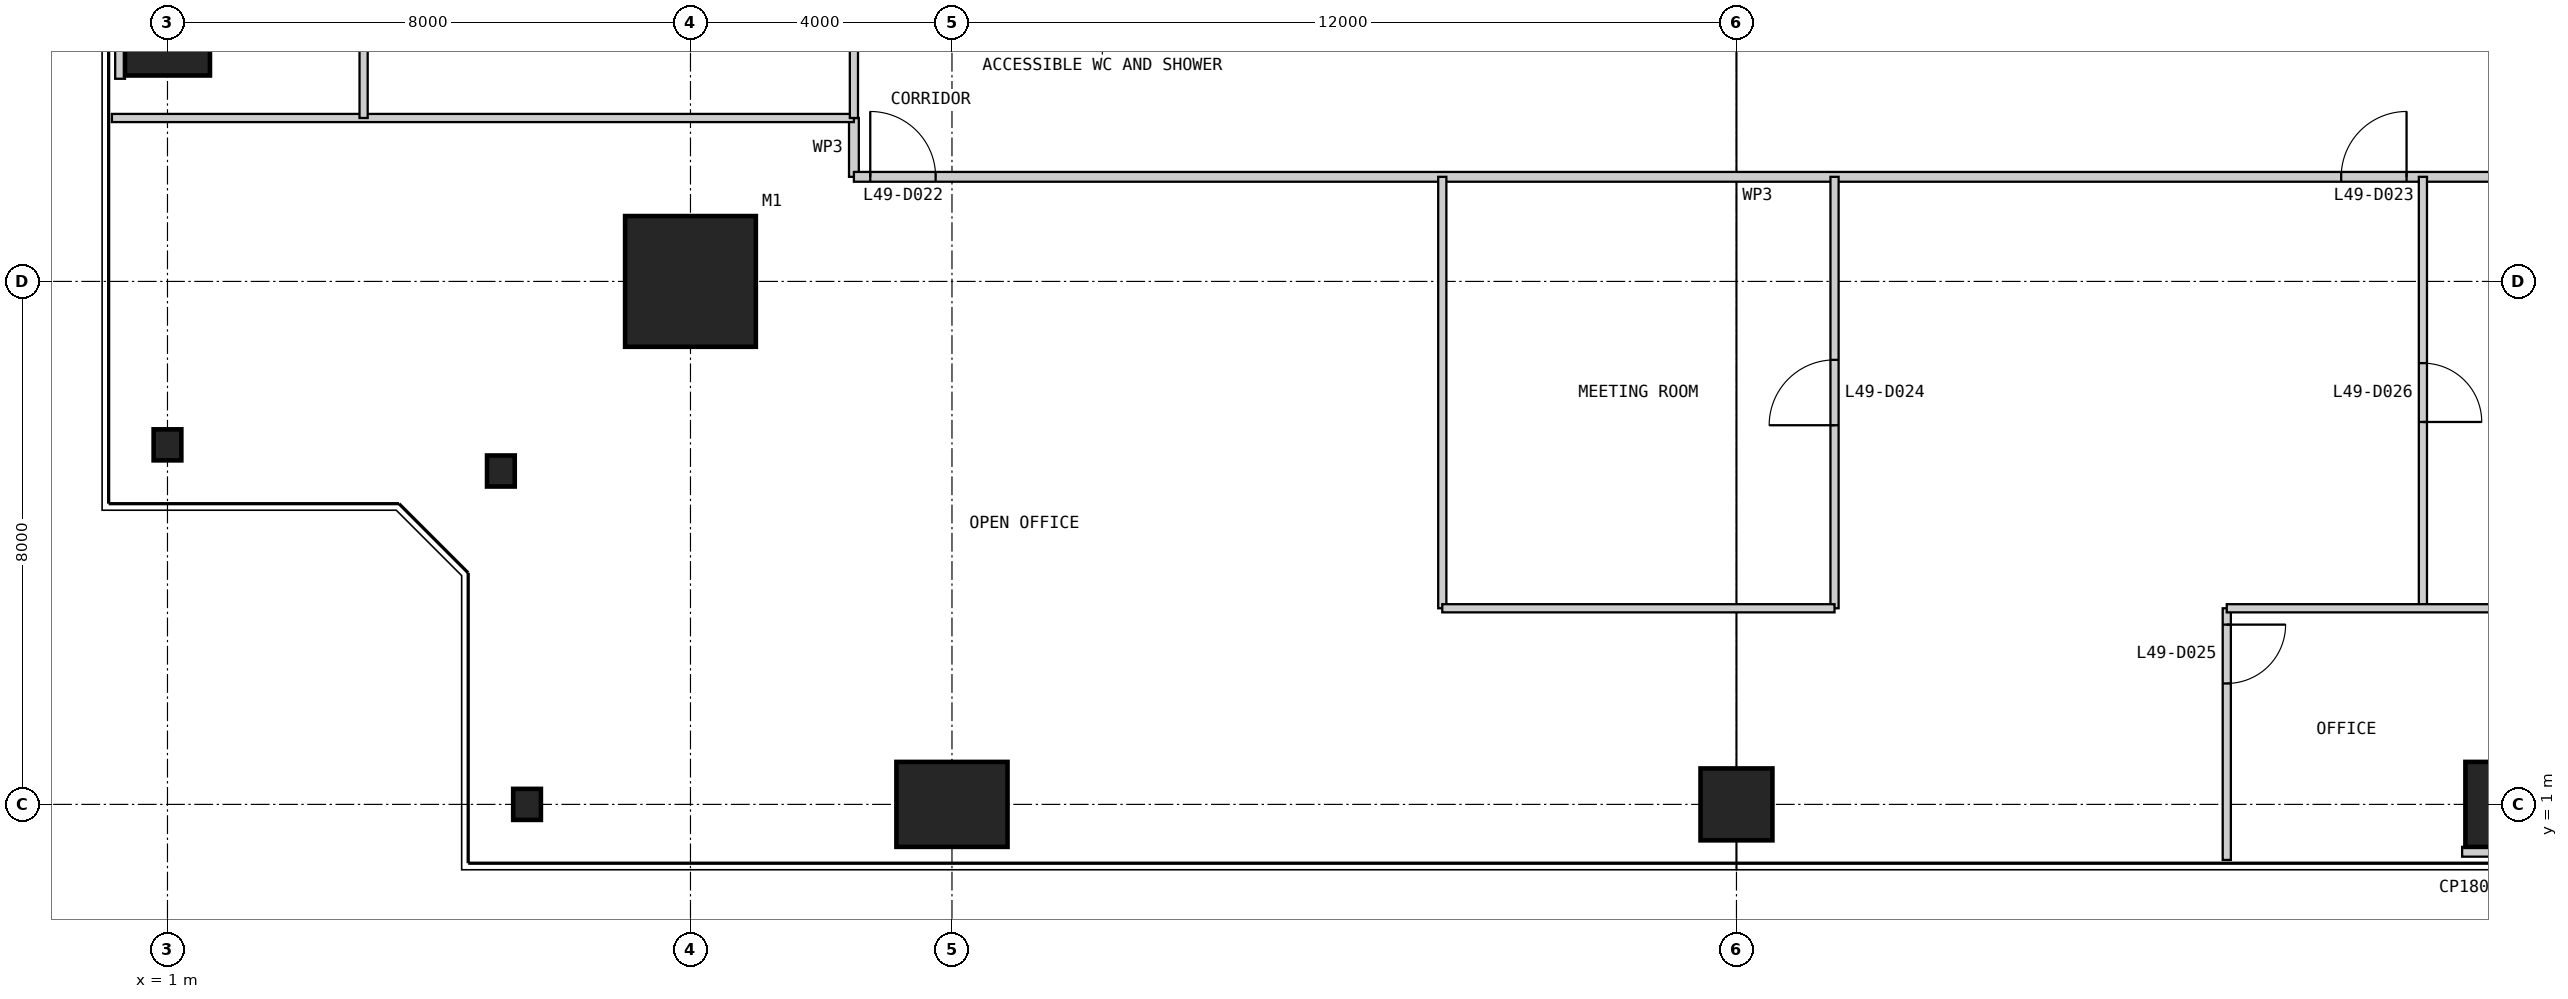
"""IFC4 building model, lengths in metres.
Left out: names, types, materials, properties, quantities, classifications, styles, units other than length and angle.
Written with IfcOpenShell. Run it as: python <this file> out.ifc"""

import sys

from ifc_helpers import new_model, si_unit, direction, frame, frame_2d, origin, origin_2d, place, context, subcontext, project, spatial, rectangle, i_section, extrude, element, fill, save


model = new_model("IFC4")
c1 = context("Model", 3, precision=1e-05, world=origin(), true_north=direction((0.0, 1.0)))
c2 = subcontext(c1, "Body", "Model", "MODEL_VIEW")
j1 = project(units=[si_unit("LENGTHUNIT", "METRE"), si_unit("PLANEANGLEUNIT", "RADIAN")], contexts=[c1])
p1 = place(None, origin())
s1 = spatial("IfcSite", under=j1, at=p1, CompositionType="ELEMENT")
p2 = place(p1, origin())
s2 = spatial("IfcBuilding", under=s1, at=p2, CompositionType="ELEMENT")
p3 = place(p2, frame((0.0, 0.0, 209.8)))
s3 = spatial("IfcBuildingStorey", under=s2, at=p3, CompositionType="ELEMENT", Elevation=209.8)
p4 = place(p3, frame((9.0, 9.0, 0.0), z_axis=(0.0, 0.0, 1.0), x_axis=(1.0, 0.0, 0.0)))
e1 = element("IfcColumn", 1, at=p4, inside=s3, PredefinedType="COLUMN", context=c2, shape_type="SweptSolid", body=[
    extrude(rectangle(XDim=2.0, YDim=2.0, at=origin_2d()), origin(), (0.0, 0.0, 1.0), 4.0),
])
p5 = place(p3, frame((6.5, 1.0, 0.0), z_axis=(0.0, 0.0, 1.0), x_axis=(1.0, 0.0, 0.0)))
e2 = element("IfcColumn", 2, at=p5, inside=s3, PredefinedType="COLUMN", context=c2, shape_type="SweptSolid", body=[
    extrude(i_section(OverallWidth=0.424, OverallDepth=0.475, WebThickness=0.048, FlangeThickness=0.077, at=origin_2d()), origin(), (0.0, 0.0, 1.0), 4.0),
])
p6 = place(p3, frame((13.0, 1.0, 0.0), z_axis=(0.0, 0.0, 1.0), x_axis=(1.0, 0.0, 0.0)))
e3 = element("IfcColumn", 3, at=p6, inside=s3, PredefinedType="COLUMN", context=c2, shape_type="SweptSolid", body=[
    extrude(rectangle(XDim=1.7, YDim=1.3, at=origin_2d()), origin(), (0.0, 0.0, 1.0), 4.0),
])
p7 = place(p3, frame((25.0, 1.0, 0.0), z_axis=(0.0, 0.0, 1.0), x_axis=(1.0, 0.0, 0.0)))
e4 = element("IfcColumn", 4, at=p7, inside=s3, PredefinedType="COLUMN", context=c2, shape_type="SweptSolid", body=[
    extrude(rectangle(XDim=1.1, YDim=1.1, at=origin_2d()), origin(), (0.0, 0.0, 1.0), 4.0),
])
p8 = place(p3, frame((37.0, 1.0, 0.0), z_axis=(0.0, 0.0, 1.0), x_axis=(1.0, 0.0, 0.0)))
e5 = element("IfcColumn", 5, at=p8, inside=s3, PredefinedType="COLUMN", context=c2, shape_type="SweptSolid", body=[
    extrude(rectangle(XDim=1.7, YDim=1.3, at=origin_2d()), origin(), (0.0, 0.0, 1.0), 4.0),
])
p9 = place(p3, frame((1.0, 13.0, 0.0), z_axis=(0.0, 0.0, 1.0), x_axis=(1.0, 0.0, 0.0)))
e6 = element("IfcColumn", 6, at=p9, inside=s3, PredefinedType="COLUMN", context=c2, shape_type="SweptSolid", body=[
    extrude(rectangle(XDim=1.3, YDim=1.7, at=origin_2d()), origin(), (0.0, 0.0, 1.0), 4.0),
])
for number, where, z_axis, x_axis in (
    (7, (1.0, 6.5, 0.0), (0.0, 0.0, 1.0), (1.0, 0.0, 0.0)),
    (8, (6.1, 6.1, 0.0), (0.0, 0.0, 1.0), (1.0, 0.0, 0.0)),
):
    element("IfcColumn", number, at=place(p3, frame(where, z_axis=z_axis, x_axis=x_axis)), inside=s3, PredefinedType="COLUMN", context=c2, shape_type="SweptSolid", body=[
        extrude(i_section(OverallWidth=0.424, OverallDepth=0.475, WebThickness=0.048, FlangeThickness=0.077, at=origin_2d()), origin(), (0.0, 0.0, 1.0), 4.0),
    ])
p10 = place(p3, frame((11.5, 11.5, 0.0), z_axis=(0.0, 0.0, 1.0), x_axis=(0.0, -1.0, 0.0)))
e9 = element("IfcWall", 9, at=p10, inside=s3, PredefinedType="PARTITIONING", context=c2, shape_type="SweptSolid", body=[
    extrude(rectangle(XDim=0.9, YDim=0.15, at=frame_2d((0.45, 0.0))), origin(), (0.0, 0.0, 1.0), 3.85),
])
p11 = place(p3, frame((11.5, 10.6, 0.0), z_axis=(0.0, 0.0, 1.0), x_axis=(1.0, 0.0, 0.0)))
e10 = element("IfcWall", 10, at=p11, inside=s3, PredefinedType="PARTITIONING", context=c2, shape_type="SweptSolid", body=[
    extrude(rectangle(XDim=27.0, YDim=0.15, at=frame_2d((13.5, 0.0))), origin(), (0.0, 0.0, 1.0), 3.85),
])
p12 = place(p11, frame((0.25, 0.0, 0.0)))
e11 = element("IfcOpeningElement", 11, at=p12, cuts=e10, PredefinedType="OPENING", context=c2, shape_type="SweptSolid", body=[
    extrude(rectangle(XDim=1.0, YDim=2.2, at=frame_2d((0.5, 1.1))), frame((0.0, 0.085, 0.0), z_axis=(0.0, -1.0, 0.0), x_axis=(1.0, 0.0, 0.0)), (0.0, 0.0, 1.0), 0.17),
])
p13 = place(p11, frame((22.75, 0.0, 0.0)))
e12 = element("IfcOpeningElement", 12, at=p13, cuts=e10, PredefinedType="OPENING", context=c2, shape_type="SweptSolid", body=[
    extrude(rectangle(XDim=1.0, YDim=2.2, at=frame_2d((0.5, 1.1))), frame((0.0, 0.085, 0.0), z_axis=(0.0, -1.0, 0.0), x_axis=(1.0, 0.0, 0.0)), (0.0, 0.0, 1.0), 0.17),
])
p14 = place(p3, frame((0.15, 11.5, 0.0), z_axis=(0.0, 0.0, 1.0), x_axis=(1.0, 0.0, 0.0)))
e13 = element("IfcWall", 13, at=p14, inside=s3, PredefinedType="PARTITIONING", context=c2, shape_type="SweptSolid", body=[
    extrude(rectangle(XDim=11.35, YDim=0.125, at=frame_2d((5.675, 0.0))), origin(), (0.0, 0.0, 1.0), 3.85),
])
p15 = place(p3, frame((20.5, 4.0, 0.0), z_axis=(0.0, 0.0, 1.0), x_axis=(0.0, 1.0, 0.0)))
e14 = element("IfcWall", 14, at=p15, inside=s3, PredefinedType="PARTITIONING", context=c2, shape_type="SweptSolid", body=[
    extrude(rectangle(XDim=6.6, YDim=0.125, at=frame_2d((3.3, 0.0))), origin(), (0.0, 0.0, 1.0), 3.85),
])
p16 = place(p3, frame((26.5, 4.0, 0.0), z_axis=(0.0, 0.0, 1.0), x_axis=(0.0, 1.0, 0.0)))
e15 = element("IfcWall", 15, at=p16, inside=s3, PredefinedType="PARTITIONING", context=c2, shape_type="SweptSolid", body=[
    extrude(rectangle(XDim=6.6, YDim=0.125, at=frame_2d((3.3, 0.0))), origin(), (0.0, 0.0, 1.0), 3.85),
])
p17 = place(p16, frame((2.8, 0.0, 0.0)))
e16 = element("IfcOpeningElement", 16, at=p17, cuts=e15, PredefinedType="OPENING", context=c2, shape_type="SweptSolid", body=[
    extrude(rectangle(XDim=1.0, YDim=2.2, at=frame_2d((0.5, 1.1))), frame((0.0, 0.073, 0.0), z_axis=(0.0, -1.0, 0.0), x_axis=(1.0, 0.0, 0.0)), (0.0, 0.0, 1.0), 0.145),
])
p18 = place(p3, frame((32.5, 0.15, 0.0), z_axis=(0.0, 0.0, 1.0), x_axis=(0.0, 1.0, 0.0)))
e17 = element("IfcWall", 17, at=p18, inside=s3, PredefinedType="PARTITIONING", context=c2, shape_type="SweptSolid", body=[
    extrude(rectangle(XDim=3.85, YDim=0.125, at=frame_2d((1.925, 0.0))), origin(), (0.0, 0.0, 1.0), 3.85),
])
p19 = place(p18, frame((2.7, 0.0, 0.0)))
e18 = element("IfcOpeningElement", 18, at=p19, cuts=e17, PredefinedType="OPENING", context=c2, shape_type="SweptSolid", body=[
    extrude(rectangle(XDim=0.9, YDim=2.2, at=frame_2d((0.45, 1.1))), frame((0.0, 0.073, 0.0), z_axis=(0.0, -1.0, 0.0), x_axis=(1.0, 0.0, 0.0)), (0.0, 0.0, 1.0), 0.145),
])
p20 = place(p3, frame((35.5, 4.0, 0.0), z_axis=(0.0, 0.0, 1.0), x_axis=(0.0, 1.0, 0.0)))
e19 = element("IfcWall", 19, at=p20, inside=s3, PredefinedType="PARTITIONING", context=c2, shape_type="SweptSolid", body=[
    extrude(rectangle(XDim=6.6, YDim=0.125, at=frame_2d((3.3, 0.0))), origin(), (0.0, 0.0, 1.0), 3.85),
])
p21 = place(p20, frame((2.85, 0.0, 0.0)))
e20 = element("IfcOpeningElement", 20, at=p21, cuts=e19, PredefinedType="OPENING", context=c2, shape_type="SweptSolid", body=[
    extrude(rectangle(XDim=0.9, YDim=2.2, at=frame_2d((0.45, 1.1))), frame((0.0, 0.073, 0.0), z_axis=(0.0, -1.0, 0.0), x_axis=(1.0, 0.0, 0.0)), (0.0, 0.0, 1.0), 0.145),
])
for number, where, z_axis, x_axis in (
    (21, (20.5, 4.0, 0.0), (0.0, 0.0, 1.0), (1.0, 0.0, 0.0)),
    (22, (32.5, 4.0, 0.0), (0.0, 0.0, 1.0), (1.0, 0.0, 0.0)),
):
    element("IfcWall", number, at=place(p3, frame(where, z_axis=z_axis, x_axis=x_axis)), inside=s3, PredefinedType="PARTITIONING", context=c2, shape_type="SweptSolid", body=[
        extrude(rectangle(XDim=6.0, YDim=0.125, at=frame_2d((3.0, 0.0))), origin(), (0.0, 0.0, 1.0), 3.85),
    ])
p22 = place(p3, frame((4.0, 17.5, 0.0), z_axis=(0.0, 0.0, 1.0), x_axis=(0.0, -1.0, 0.0)))
e23 = element("IfcWall", 23, at=p22, inside=s3, PredefinedType="PARTITIONING", context=c2, shape_type="SweptSolid", body=[
    extrude(rectangle(XDim=6.0, YDim=0.125, at=frame_2d((3.0, 0.0))), origin(), (0.0, 0.0, 1.0), 3.238),
])
p23 = place(p3, frame((11.5, 14.5, 0.0), z_axis=(0.0, 0.0, 1.0), x_axis=(0.0, -1.0, 0.0)))
e24 = element("IfcWall", 24, at=p23, inside=s3, PredefinedType="PARTITIONING", context=c2, shape_type="SweptSolid", body=[
    extrude(rectangle(XDim=3.0, YDim=0.125, at=frame_2d((1.5, 0.0))), origin(), (0.0, 0.0, 1.0), 3.85),
])
for number, where, z_axis, x_axis in (
    (25, (37.0, 0.2, 0.0), (0.0, 0.0, 1.0), (0.0, 1.0, 0.0)),
    (26, (0.2, 13.0, 0.0), (0.0, 0.0, 1.0), (1.0, 0.0, 0.0)),
):
    element("IfcWall", number, at=place(p3, frame(where, z_axis=z_axis, x_axis=x_axis)), inside=s3, PredefinedType="PARTITIONING", context=c2, shape_type="SweptSolid", body=[
        extrude(rectangle(XDim=0.15, YDim=1.8, at=frame_2d((0.075, 0.0))), origin(), (0.0, 0.0, 1.0), 3.85),
    ])
p24 = place(p12, origin())
e27 = element("IfcDoor", 27, at=p24, inside=s3, OperationType="SINGLE_SWING_LEFT", PredefinedType="DOOR", context=c2, shape_type="SweptSolid", body=[
    extrude(rectangle(XDim=1.0, YDim=2.2, at=frame_2d((0.5, 1.1))), frame((0.0, 0.025, 0.0), z_axis=(0.0, -1.0, 0.0), x_axis=(1.0, 0.0, 0.0)), (0.0, 0.0, 1.0), 0.05),
])
fill(e11, e27)
p25 = place(p13, origin())
e28 = element("IfcDoor", 28, at=p25, inside=s3, OperationType="SINGLE_SWING_RIGHT", PredefinedType="DOOR", context=c2, shape_type="SweptSolid", body=[
    extrude(rectangle(XDim=1.0, YDim=2.2, at=frame_2d((0.5, 1.1))), frame((0.0, 0.025, 0.0), z_axis=(0.0, -1.0, 0.0), x_axis=(1.0, 0.0, 0.0)), (0.0, 0.0, 1.0), 0.05),
])
fill(e12, e28)
p26 = place(p17, origin())
e29 = element("IfcDoor", 29, at=p26, inside=s3, OperationType="SINGLE_SWING_LEFT", PredefinedType="DOOR", context=c2, shape_type="SweptSolid", body=[
    extrude(rectangle(XDim=1.0, YDim=2.2, at=frame_2d((0.5, 1.1))), frame((0.0, 0.025, 0.0), z_axis=(0.0, -1.0, 0.0), x_axis=(1.0, 0.0, 0.0)), (0.0, 0.0, 1.0), 0.05),
])
fill(e16, e29)
p27 = place(p19, frame((0.9, 0.0, 0.0), z_axis=(0.0, 0.0, 1.0), x_axis=(-1.0, 0.0, 0.0)))
e30 = element("IfcDoor", 30, at=p27, inside=s3, OperationType="SINGLE_SWING_LEFT", PredefinedType="DOOR", context=c2, shape_type="SweptSolid", body=[
    extrude(rectangle(XDim=0.9, YDim=2.2, at=frame_2d((0.45, 1.1))), frame((0.0, 0.025, 0.0), z_axis=(0.0, -1.0, 0.0), x_axis=(1.0, 0.0, 0.0)), (0.0, 0.0, 1.0), 0.05),
])
fill(e18, e30)
p28 = place(p21, frame((0.9, 0.0, 0.0), z_axis=(0.0, 0.0, 1.0), x_axis=(-1.0, 0.0, 0.0)))
e31 = element("IfcDoor", 31, at=p28, inside=s3, OperationType="SINGLE_SWING_RIGHT", PredefinedType="DOOR", context=c2, shape_type="SweptSolid", body=[
    extrude(rectangle(XDim=0.9, YDim=2.2, at=frame_2d((0.45, 1.1))), frame((0.0, 0.025, 0.0), z_axis=(0.0, -1.0, 0.0), x_axis=(1.0, 0.0, 0.0)), (0.0, 0.0, 1.0), 0.05),
])
fill(e20, e31)
save(model, sys.argv[1])
